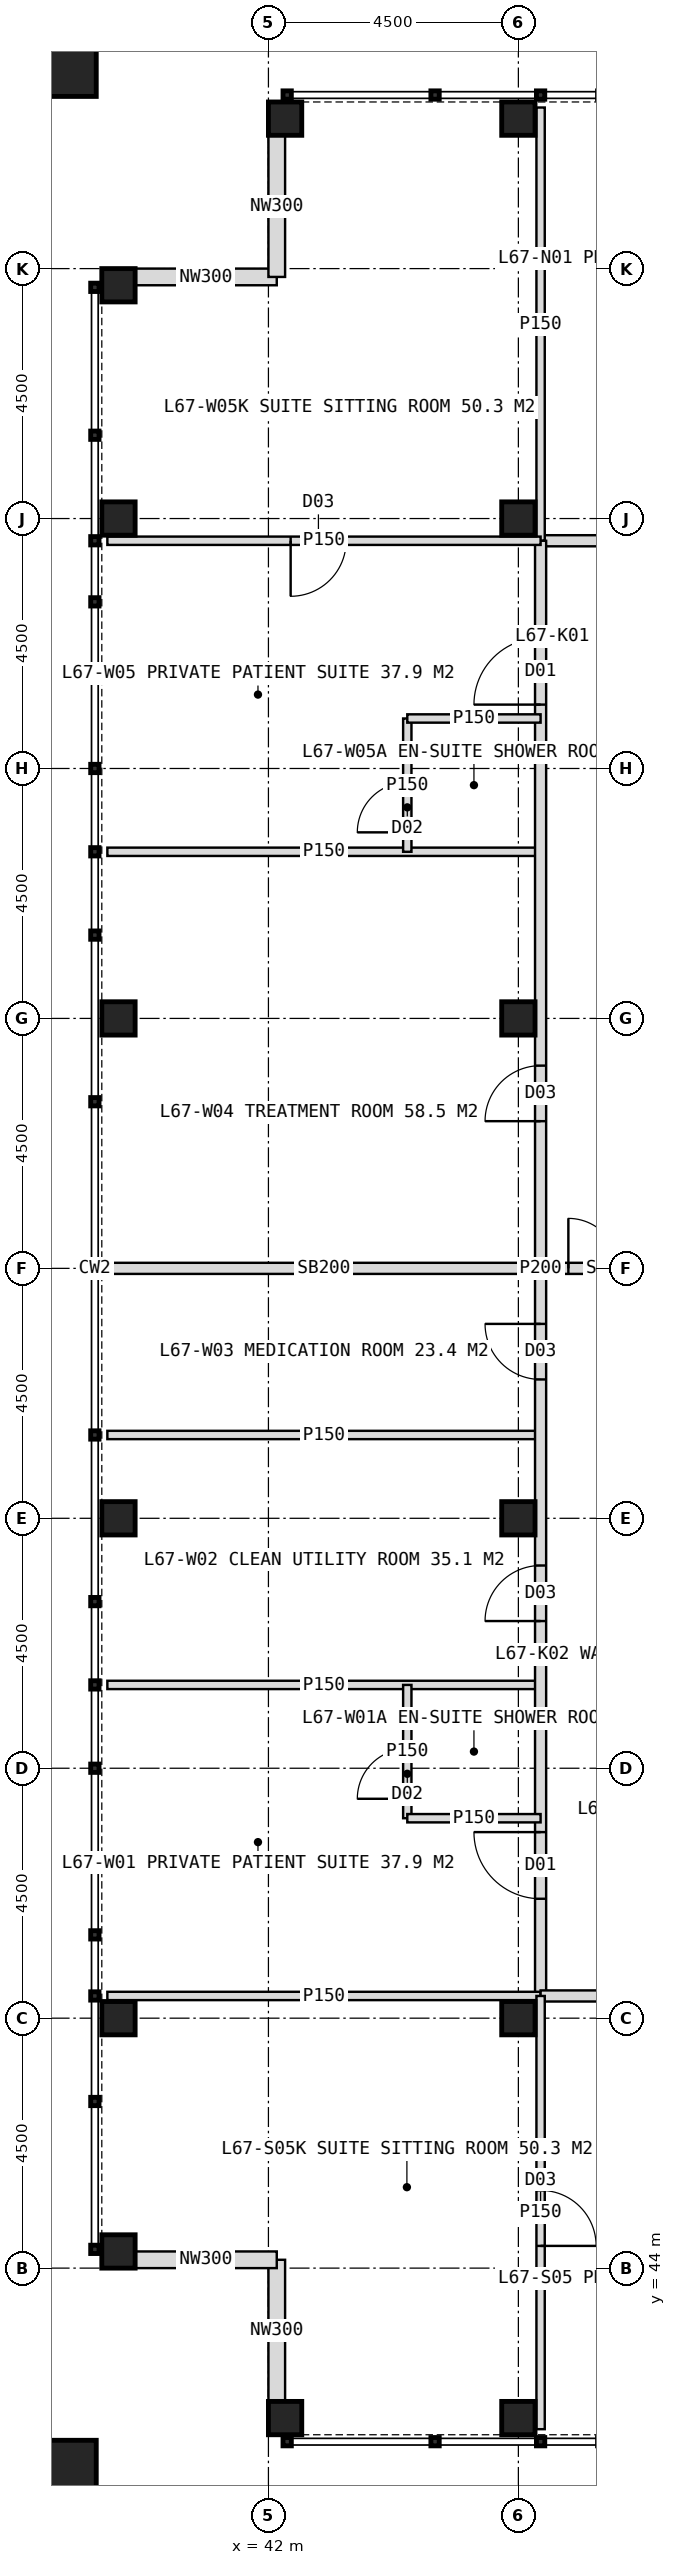
"""IFC4 building model, lengths in metres.
Left out: names, types, materials, properties, quantities, classifications, styles, units other than length and angle.
Written with IfcOpenShell. Run it as: python <this file> out.ifc"""

import sys

from ifc_helpers import new_model, si_unit, direction, frame, frame_2d, origin, origin_2d, place, context, subcontext, project, spatial, rectangle, hollow_rectangle, extrude, element, fill, save


model = new_model("IFC4")
c1 = context("Model", 3, precision=1e-05, world=origin(), true_north=direction((0.0, 1.0)))
c2 = subcontext(c1, "Body", "Model", "MODEL_VIEW")
j1 = project(units=[si_unit("LENGTHUNIT", "METRE"), si_unit("PLANEANGLEUNIT", "RADIAN")], contexts=[c1])
p1 = place(None, origin())
s1 = spatial("IfcSite", under=j1, at=p1, CompositionType="ELEMENT")
p2 = place(p1, origin())
s2 = spatial("IfcBuilding", under=s1, at=p2, CompositionType="ELEMENT")
p3 = place(p2, frame((0.0, 0.0, 278.0)))
s3 = spatial("IfcBuildingStorey", under=s2, at=p3, CompositionType="ELEMENT", Elevation=278.0)
for number, where, z_axis, x_axis in (
    (1, (46.5, 48.5, 0.0), (0.0, 0.0, 1.0), (1.0, 0.0, 0.0)),
    (2, (46.5, 75.5, 0.0), (0.0, 0.0, 1.0), (1.0, 0.0, 0.0)),
    (3, (46.5, 57.5, 0.0), (0.0, 0.0, 1.0), (1.0, 0.0, 0.0)),
    (4, (46.5, 66.5, 0.0), (0.0, 0.0, 1.0), (1.0, 0.0, 0.0)),
    (5, (42.3, 41.3, 0.0), (0.0, 0.0, 1.0), (1.0, 0.0, 0.0)),
    (6, (42.3, 82.7, 0.0), (0.0, 0.0, 1.0), (1.0, 0.0, 0.0)),
    (7, (39.3, 44.3, 0.0), (0.0, 0.0, 1.0), (1.0, 0.0, 0.0)),
    (8, (46.5, 41.3, 0.0), (0.0, 0.0, 1.0), (1.0, 0.0, 0.0)),
    (9, (46.5, 82.7, 0.0), (0.0, 0.0, 1.0), (1.0, 0.0, 0.0)),
    (10, (39.3, 48.5, 0.0), (0.0, 0.0, 1.0), (1.0, 0.0, 0.0)),
    (11, (39.3, 57.5, 0.0), (0.0, 0.0, 1.0), (1.0, 0.0, 0.0)),
    (12, (39.3, 66.5, 0.0), (0.0, 0.0, 1.0), (1.0, 0.0, 0.0)),
    (13, (39.3, 75.5, 0.0), (0.0, 0.0, 1.0), (1.0, 0.0, 0.0)),
    (14, (39.3, 79.7, 0.0), (0.0, 0.0, 1.0), (1.0, 0.0, 0.0)),
):
    element("IfcColumn", number, at=place(p3, frame(where, z_axis=z_axis, x_axis=x_axis)), inside=s3, PredefinedType="COLUMN", context=c2, shape_type="SweptSolid", body=[
        extrude(hollow_rectangle(XDim=0.6, YDim=0.6, WallThickness=0.04, at=origin_2d()), origin(), (0.0, 0.0, 1.0), 4.0),
    ])
for number, where, z_axis, x_axis in (
    (15, (38.4, 40.4, 0.0), (0.0, 0.0, 1.0), (1.0, 0.0, 0.0)),
    (16, (38.4, 83.6, 0.0), (0.0, 0.0, 1.0), (1.0, 0.0, 0.0)),
):
    element("IfcColumn", number, at=place(p3, frame(where, z_axis=z_axis, x_axis=x_axis)), inside=s3, PredefinedType="COLUMN", context=c2, shape_type="SweptSolid", body=[
        extrude(hollow_rectangle(XDim=1.0, YDim=1.0, WallThickness=0.06, at=origin_2d()), origin(), (0.0, 0.0, 1.0), 4.0),
    ])
for number, where, z_axis, x_axis in (
    (17, (39.6, 79.85, 0.0), (0.0, 0.0, 1.0), (1.0, 0.0, 0.0)),
    (18, (42.15, 79.85, 0.0), (0.0, 0.0, 1.0), (0.0, 1.0, 0.0)),
    (19, (42.15, 41.6, 0.0), (0.0, 0.0, 1.0), (0.0, 1.0, 0.0)),
    (20, (42.15, 44.15, 0.0), (0.0, 0.0, 1.0), (-1.0, 0.0, 0.0)),
):
    element("IfcWall", number, at=place(p3, frame(where, z_axis=z_axis, x_axis=x_axis)), inside=s3, PredefinedType="ELEMENTEDWALL", context=c2, shape_type="SweptSolid", body=[
        extrude(rectangle(XDim=2.55, YDim=0.3, at=frame_2d((1.275, 0.0))), origin(), (0.0, 0.0, 1.0), 2.95),
    ])
p4 = place(p3, frame((46.9, 75.1, 0.0), z_axis=(0.0, 0.0, 1.0), x_axis=(1.0, 0.0, 0.0)))
e21 = element("IfcWall", 21, at=p4, inside=s3, PredefinedType="PARTITIONING", context=c2, shape_type="SweptSolid", body=[
    extrude(rectangle(XDim=26.2, YDim=0.2, at=frame_2d((13.1, 0.0))), origin(), (0.0, 0.0, 1.0), 3.75),
])
p5 = place(p4, frame((1.75, 0.0, 0.0)))
e22 = element("IfcOpeningElement", 22, at=p5, cuts=e21, PredefinedType="OPENING", context=c2, shape_type="SweptSolid", body=[
    extrude(rectangle(XDim=1.2, YDim=2.2, at=frame_2d((0.6, 1.1))), frame((0.0, 0.11, 0.0), z_axis=(0.0, -1.0, 0.0), x_axis=(1.0, 0.0, 0.0)), (0.0, 0.0, 1.0), 0.22),
])
p6 = place(p4, frame((6.75, 0.0, 0.0)))
e23 = element("IfcOpeningElement", 23, at=p6, cuts=e21, PredefinedType="OPENING", context=c2, shape_type="SweptSolid", body=[
    extrude(rectangle(XDim=1.0, YDim=2.1, at=frame_2d((0.5, 1.05))), frame((0.0, 0.11, 0.0), z_axis=(0.0, -1.0, 0.0), x_axis=(1.0, 0.0, 0.0)), (0.0, 0.0, 1.0), 0.22),
])
p7 = place(p4, frame((12.75, 0.0, 0.0)))
e24 = element("IfcOpeningElement", 24, at=p7, cuts=e21, PredefinedType="OPENING", context=c2, shape_type="SweptSolid", body=[
    extrude(rectangle(XDim=1.2, YDim=2.2, at=frame_2d((0.6, 1.1))), frame((0.0, 0.11, 0.0), z_axis=(0.0, -1.0, 0.0), x_axis=(1.0, 0.0, 0.0)), (0.0, 0.0, 1.0), 0.22),
])
p8 = place(p4, frame((18.45, 0.0, 0.0)))
e25 = element("IfcOpeningElement", 25, at=p8, cuts=e21, PredefinedType="OPENING", context=c2, shape_type="SweptSolid", body=[
    extrude(rectangle(XDim=1.0, YDim=2.1, at=frame_2d((0.5, 1.05))), frame((0.0, 0.11, 0.0), z_axis=(0.0, -1.0, 0.0), x_axis=(1.0, 0.0, 0.0)), (0.0, 0.0, 1.0), 0.22),
])
p9 = place(p4, frame((23.25, 0.0, 0.0)))
e26 = element("IfcOpeningElement", 26, at=p9, cuts=e21, PredefinedType="OPENING", context=c2, shape_type="SweptSolid", body=[
    extrude(rectangle(XDim=1.2, YDim=2.2, at=frame_2d((0.6, 1.1))), frame((0.0, 0.11, 0.0), z_axis=(0.0, -1.0, 0.0), x_axis=(1.0, 0.0, 0.0)), (0.0, 0.0, 1.0), 0.22),
])
for number, where, z_axis, x_axis in (
    (27, (46.9, 75.1, 0.0), (0.0, 0.0, 1.0), (0.0, 1.0, 0.0)),
    (28, (46.9, 54.5, 0.0), (0.0, 0.0, 1.0), (-1.0, 0.0, 0.0)),
    (29, (46.9, 59.0, 0.0), (0.0, 0.0, 1.0), (-1.0, 0.0, 0.0)),
):
    element("IfcWall", number, at=place(p3, frame(where, z_axis=z_axis, x_axis=x_axis)), inside=s3, PredefinedType="PARTITIONING", context=c2, shape_type="SweptSolid", body=[
        extrude(rectangle(XDim=7.8, YDim=0.15, at=frame_2d((3.9, 0.0))), origin(), (0.0, 0.0, 1.0), 3.75),
    ])
p10 = place(p3, frame((46.9, 62.0, 0.0), z_axis=(0.0, 0.0, 1.0), x_axis=(-1.0, 0.0, 0.0)))
e30 = element("IfcWall", 30, at=p10, inside=s3, PredefinedType="SOLIDWALL", context=c2, shape_type="SweptSolid", body=[
    extrude(rectangle(XDim=7.8, YDim=0.2, at=frame_2d((3.9, 0.0))), origin(), (0.0, 0.0, 1.0), 2.75),
])
p11 = place(p3, frame((46.9, 69.5, 0.0), z_axis=(0.0, 0.0, 1.0), x_axis=(-1.0, 0.0, 0.0)))
e31 = element("IfcWall", 31, at=p11, inside=s3, PredefinedType="PARTITIONING", context=c2, shape_type="SweptSolid", body=[
    extrude(rectangle(XDim=7.8, YDim=0.15, at=frame_2d((3.9, 0.0))), origin(), (0.0, 0.0, 1.0), 3.75),
])
p12 = place(p3, frame((46.9, 48.9, 0.0), z_axis=(0.0, 0.0, 1.0), x_axis=(0.0, 1.0, 0.0)))
e32 = element("IfcWall", 32, at=p12, inside=s3, PredefinedType="PARTITIONING", context=c2, shape_type="SweptSolid", body=[
    extrude(rectangle(XDim=26.2, YDim=0.2, at=frame_2d((13.1, 0.0))), origin(), (0.0, 0.0, 1.0), 3.75),
])
p13 = place(p12, frame((1.75, 0.0, 0.0)))
e33 = element("IfcOpeningElement", 33, at=p13, cuts=e32, PredefinedType="OPENING", context=c2, shape_type="SweptSolid", body=[
    extrude(rectangle(XDim=1.2, YDim=2.2, at=frame_2d((0.6, 1.1))), frame((0.0, 0.11, 0.0), z_axis=(0.0, -1.0, 0.0), x_axis=(1.0, 0.0, 0.0)), (0.0, 0.0, 1.0), 0.22),
])
p14 = place(p12, frame((6.75, 0.0, 0.0)))
e34 = element("IfcOpeningElement", 34, at=p14, cuts=e32, PredefinedType="OPENING", context=c2, shape_type="SweptSolid", body=[
    extrude(rectangle(XDim=1.0, YDim=2.1, at=frame_2d((0.5, 1.05))), frame((0.0, 0.11, 0.0), z_axis=(0.0, -1.0, 0.0), x_axis=(1.0, 0.0, 0.0)), (0.0, 0.0, 1.0), 0.22),
])
p15 = place(p12, frame((11.1, 0.0, 0.0)))
e35 = element("IfcOpeningElement", 35, at=p15, cuts=e32, PredefinedType="OPENING", context=c2, shape_type="SweptSolid", body=[
    extrude(rectangle(XDim=1.0, YDim=2.1, at=frame_2d((0.5, 1.05))), frame((0.0, 0.11, 0.0), z_axis=(0.0, -1.0, 0.0), x_axis=(1.0, 0.0, 0.0)), (0.0, 0.0, 1.0), 0.22),
])
p16 = place(p12, frame((15.75, 0.0, 0.0)))
e36 = element("IfcOpeningElement", 36, at=p16, cuts=e32, PredefinedType="OPENING", context=c2, shape_type="SweptSolid", body=[
    extrude(rectangle(XDim=1.0, YDim=2.1, at=frame_2d((0.5, 1.05))), frame((0.0, 0.11, 0.0), z_axis=(0.0, -1.0, 0.0), x_axis=(1.0, 0.0, 0.0)), (0.0, 0.0, 1.0), 0.22),
])
p17 = place(p12, frame((23.25, 0.0, 0.0)))
e37 = element("IfcOpeningElement", 37, at=p17, cuts=e32, PredefinedType="OPENING", context=c2, shape_type="SweptSolid", body=[
    extrude(rectangle(XDim=1.2, YDim=2.2, at=frame_2d((0.6, 1.1))), frame((0.0, 0.11, 0.0), z_axis=(0.0, -1.0, 0.0), x_axis=(1.0, 0.0, 0.0)), (0.0, 0.0, 1.0), 0.22),
])
p18 = place(p3, frame((46.9, 48.9, 0.0), z_axis=(0.0, 0.0, 1.0), x_axis=(-1.0, 0.0, 0.0)))
e38 = element("IfcWall", 38, at=p18, inside=s3, PredefinedType="PARTITIONING", context=c2, shape_type="SweptSolid", body=[
    extrude(rectangle(XDim=7.8, YDim=0.15, at=frame_2d((3.9, 0.0))), origin(), (0.0, 0.0, 1.0), 3.75),
])
p19 = place(p3, frame((44.5, 52.1, 0.0), z_axis=(0.0, 0.0, 1.0), x_axis=(0.0, 1.0, 0.0)))
e39 = element("IfcWall", 39, at=p19, inside=s3, PredefinedType="PARTITIONING", context=c2, shape_type="SweptSolid", body=[
    extrude(rectangle(XDim=2.4, YDim=0.15, at=frame_2d((1.2, 0.0))), origin(), (0.0, 0.0, 1.0), 3.75),
])
p20 = place(p19, frame((0.35, 0.0, 0.0)))
e40 = element("IfcOpeningElement", 40, at=p20, cuts=e39, PredefinedType="OPENING", context=c2, shape_type="SweptSolid", body=[
    extrude(rectangle(XDim=0.9, YDim=2.1, at=frame_2d((0.45, 1.05))), frame((0.0, 0.085, 0.0), z_axis=(0.0, -1.0, 0.0), x_axis=(1.0, 0.0, 0.0)), (0.0, 0.0, 1.0), 0.17),
])
p21 = place(p3, frame((46.9, 52.1, 0.0), z_axis=(0.0, 0.0, 1.0), x_axis=(-1.0, 0.0, 0.0)))
e41 = element("IfcWall", 41, at=p21, inside=s3, PredefinedType="PARTITIONING", context=c2, shape_type="SweptSolid", body=[
    extrude(rectangle(XDim=2.4, YDim=0.15, at=frame_2d((1.2, 0.0))), origin(), (0.0, 0.0, 1.0), 3.75),
])
p22 = place(p3, frame((46.9, 75.1, 0.0), z_axis=(0.0, 0.0, 1.0), x_axis=(-1.0, 0.0, 0.0)))
e42 = element("IfcWall", 42, at=p22, inside=s3, PredefinedType="PARTITIONING", context=c2, shape_type="SweptSolid", body=[
    extrude(rectangle(XDim=7.8, YDim=0.15, at=frame_2d((3.9, 0.0))), origin(), (0.0, 0.0, 1.0), 3.75),
])
p23 = place(p22, frame((3.5, 0.0, 0.0)))
e43 = element("IfcOpeningElement", 43, at=p23, cuts=e42, PredefinedType="OPENING", context=c2, shape_type="SweptSolid", body=[
    extrude(rectangle(XDim=1.0, YDim=2.1, at=frame_2d((0.5, 1.05))), frame((0.0, 0.085, 0.0), z_axis=(0.0, -1.0, 0.0), x_axis=(1.0, 0.0, 0.0)), (0.0, 0.0, 1.0), 0.17),
])
p24 = place(p3, frame((44.5, 69.5, 0.0), z_axis=(0.0, 0.0, 1.0), x_axis=(0.0, 1.0, 0.0)))
e44 = element("IfcWall", 44, at=p24, inside=s3, PredefinedType="PARTITIONING", context=c2, shape_type="SweptSolid", body=[
    extrude(rectangle(XDim=2.4, YDim=0.15, at=frame_2d((1.2, 0.0))), origin(), (0.0, 0.0, 1.0), 3.75),
])
p25 = place(p24, frame((0.35, 0.0, 0.0)))
e45 = element("IfcOpeningElement", 45, at=p25, cuts=e44, PredefinedType="OPENING", context=c2, shape_type="SweptSolid", body=[
    extrude(rectangle(XDim=0.9, YDim=2.1, at=frame_2d((0.45, 1.05))), frame((0.0, 0.085, 0.0), z_axis=(0.0, -1.0, 0.0), x_axis=(1.0, 0.0, 0.0)), (0.0, 0.0, 1.0), 0.17),
])
p26 = place(p3, frame((46.9, 71.9, 0.0), z_axis=(0.0, 0.0, 1.0), x_axis=(-1.0, 0.0, 0.0)))
e46 = element("IfcWall", 46, at=p26, inside=s3, PredefinedType="PARTITIONING", context=c2, shape_type="SweptSolid", body=[
    extrude(rectangle(XDim=2.4, YDim=0.15, at=frame_2d((1.2, 0.0))), origin(), (0.0, 0.0, 1.0), 3.75),
])
p27 = place(p3, frame((73.1, 48.9, 0.0), z_axis=(0.0, 0.0, 1.0), x_axis=(-1.0, 0.0, 0.0)))
e47 = element("IfcWall", 47, at=p27, inside=s3, PredefinedType="PARTITIONING", context=c2, shape_type="SweptSolid", body=[
    extrude(rectangle(XDim=26.2, YDim=0.2, at=frame_2d((13.1, 0.0))), origin(), (0.0, 0.0, 1.0), 3.75),
])
p28 = place(p27, frame((1.55, 0.0, 0.0)))
e48 = element("IfcOpeningElement", 48, at=p28, cuts=e47, PredefinedType="OPENING", context=c2, shape_type="SweptSolid", body=[
    extrude(rectangle(XDim=1.0, YDim=2.1, at=frame_2d((0.5, 1.05))), frame((0.0, 0.11, 0.0), z_axis=(0.0, -1.0, 0.0), x_axis=(1.0, 0.0, 0.0)), (0.0, 0.0, 1.0), 0.22),
])
p29 = place(p27, frame((6.75, 0.0, 0.0)))
e49 = element("IfcOpeningElement", 49, at=p29, cuts=e47, PredefinedType="OPENING", context=c2, shape_type="SweptSolid", body=[
    extrude(rectangle(XDim=1.0, YDim=2.1, at=frame_2d((0.5, 1.05))), frame((0.0, 0.11, 0.0), z_axis=(0.0, -1.0, 0.0), x_axis=(1.0, 0.0, 0.0)), (0.0, 0.0, 1.0), 0.22),
])
p30 = place(p27, frame((14.25, 0.0, 0.0)))
e50 = element("IfcOpeningElement", 50, at=p30, cuts=e47, PredefinedType="OPENING", context=c2, shape_type="SweptSolid", body=[
    extrude(rectangle(XDim=1.2, YDim=2.2, at=frame_2d((0.6, 1.1))), frame((0.0, 0.11, 0.0), z_axis=(0.0, -1.0, 0.0), x_axis=(1.0, 0.0, 0.0)), (0.0, 0.0, 1.0), 0.22),
])
p31 = place(p27, frame((18.45, 0.0, 0.0)))
e51 = element("IfcOpeningElement", 51, at=p31, cuts=e47, PredefinedType="OPENING", context=c2, shape_type="SweptSolid", body=[
    extrude(rectangle(XDim=1.0, YDim=2.1, at=frame_2d((0.5, 1.05))), frame((0.0, 0.11, 0.0), z_axis=(0.0, -1.0, 0.0), x_axis=(1.0, 0.0, 0.0)), (0.0, 0.0, 1.0), 0.22),
])
p32 = place(p27, frame((23.25, 0.0, 0.0)))
e52 = element("IfcOpeningElement", 52, at=p32, cuts=e47, PredefinedType="OPENING", context=c2, shape_type="SweptSolid", body=[
    extrude(rectangle(XDim=1.2, YDim=2.2, at=frame_2d((0.6, 1.1))), frame((0.0, 0.11, 0.0), z_axis=(0.0, -1.0, 0.0), x_axis=(1.0, 0.0, 0.0)), (0.0, 0.0, 1.0), 0.22),
])
p33 = place(p3, frame((46.9, 48.9, 0.0), z_axis=(0.0, 0.0, 1.0), x_axis=(0.0, -1.0, 0.0)))
e53 = element("IfcWall", 53, at=p33, inside=s3, PredefinedType="PARTITIONING", context=c2, shape_type="SweptSolid", body=[
    extrude(rectangle(XDim=7.8, YDim=0.15, at=frame_2d((3.9, 0.0))), origin(), (0.0, 0.0, 1.0), 3.75),
])
p34 = place(p33, frame((3.5, 0.0, 0.0)))
e54 = element("IfcOpeningElement", 54, at=p34, cuts=e53, PredefinedType="OPENING", context=c2, shape_type="SweptSolid", body=[
    extrude(rectangle(XDim=1.0, YDim=2.1, at=frame_2d((0.5, 1.05))), frame((0.0, 0.085, 0.0), z_axis=(0.0, -1.0, 0.0), x_axis=(1.0, 0.0, 0.0)), (0.0, 0.0, 1.0), 0.17),
])
p35 = place(p3, frame((49.5, 62.0, 0.0), z_axis=(0.0, 0.0, 1.0), x_axis=(-1.0, 0.0, 0.0)))
e55 = element("IfcWall", 55, at=p35, inside=s3, PredefinedType="SOLIDWALL", context=c2, shape_type="SweptSolid", body=[
    extrude(rectangle(XDim=2.6, YDim=0.2, at=frame_2d((1.3, 0.0))), origin(), (0.0, 0.0, 1.0), 2.75),
])
p36 = place(p35, frame((0.3, 0.0, 0.0)))
e56 = element("IfcOpeningElement", 56, at=p36, cuts=e55, PredefinedType="OPENING", context=c2, shape_type="SweptSolid", body=[
    extrude(rectangle(XDim=1.8, YDim=2.2, at=frame_2d((0.9, 1.1))), frame((0.0, 0.11, 0.0), z_axis=(0.0, -1.0, 0.0), x_axis=(1.0, 0.0, 0.0)), (0.0, 0.0, 1.0), 0.22),
])
p37 = place(p13, origin())
e57 = element("IfcDoor", 57, at=p37, inside=s3, OperationType="SINGLE_SWING_RIGHT", PredefinedType="DOOR", context=c2, shape_type="SweptSolid", body=[
    extrude(rectangle(XDim=1.2, YDim=2.2, at=frame_2d((0.6, 1.1))), frame((0.0, 0.025, 0.0), z_axis=(0.0, -1.0, 0.0), x_axis=(1.0, 0.0, 0.0)), (0.0, 0.0, 1.0), 0.05),
])
fill(e33, e57)
p38 = place(p20, origin())
e58 = element("IfcDoor", 58, at=p38, inside=s3, OperationType="SINGLE_SWING_LEFT", PredefinedType="DOOR", context=c2, shape_type="SweptSolid", body=[
    extrude(rectangle(XDim=0.9, YDim=2.1, at=frame_2d((0.45, 1.05))), frame((0.0, 0.025, 0.0), z_axis=(0.0, -1.0, 0.0), x_axis=(1.0, 0.0, 0.0)), (0.0, 0.0, 1.0), 0.05),
])
fill(e40, e58)
p39 = place(p14, origin())
e59 = element("IfcDoor", 59, at=p39, inside=s3, OperationType="SINGLE_SWING_LEFT", PredefinedType="DOOR", context=c2, shape_type="SweptSolid", body=[
    extrude(rectangle(XDim=1.0, YDim=2.1, at=frame_2d((0.5, 1.05))), frame((0.0, 0.025, 0.0), z_axis=(0.0, -1.0, 0.0), x_axis=(1.0, 0.0, 0.0)), (0.0, 0.0, 1.0), 0.05),
])
fill(e34, e59)
p40 = place(p15, origin())
e60 = element("IfcDoor", 60, at=p40, inside=s3, OperationType="SINGLE_SWING_RIGHT", PredefinedType="DOOR", context=c2, shape_type="SweptSolid", body=[
    extrude(rectangle(XDim=1.0, YDim=2.1, at=frame_2d((0.5, 1.05))), frame((0.0, 0.025, 0.0), z_axis=(0.0, -1.0, 0.0), x_axis=(1.0, 0.0, 0.0)), (0.0, 0.0, 1.0), 0.05),
])
fill(e35, e60)
p41 = place(p16, origin())
e61 = element("IfcDoor", 61, at=p41, inside=s3, OperationType="SINGLE_SWING_LEFT", PredefinedType="DOOR", context=c2, shape_type="SweptSolid", body=[
    extrude(rectangle(XDim=1.0, YDim=2.1, at=frame_2d((0.5, 1.05))), frame((0.0, 0.025, 0.0), z_axis=(0.0, -1.0, 0.0), x_axis=(1.0, 0.0, 0.0)), (0.0, 0.0, 1.0), 0.05),
])
fill(e36, e61)
p42 = place(p23, origin())
e62 = element("IfcDoor", 62, at=p42, inside=s3, OperationType="SINGLE_SWING_RIGHT", PredefinedType="DOOR", context=c2, shape_type="SweptSolid", body=[
    extrude(rectangle(XDim=1.0, YDim=2.1, at=frame_2d((0.5, 1.05))), frame((0.0, 0.025, 0.0), z_axis=(0.0, -1.0, 0.0), x_axis=(1.0, 0.0, 0.0)), (0.0, 0.0, 1.0), 0.05),
])
fill(e43, e62)
p43 = place(p17, origin())
e63 = element("IfcDoor", 63, at=p43, inside=s3, OperationType="SINGLE_SWING_LEFT", PredefinedType="DOOR", context=c2, shape_type="SweptSolid", body=[
    extrude(rectangle(XDim=1.2, YDim=2.2, at=frame_2d((0.6, 1.1))), frame((0.0, 0.025, 0.0), z_axis=(0.0, -1.0, 0.0), x_axis=(1.0, 0.0, 0.0)), (0.0, 0.0, 1.0), 0.05),
])
fill(e37, e63)
p44 = place(p25, origin())
e64 = element("IfcDoor", 64, at=p44, inside=s3, OperationType="SINGLE_SWING_LEFT", PredefinedType="DOOR", context=c2, shape_type="SweptSolid", body=[
    extrude(rectangle(XDim=0.9, YDim=2.1, at=frame_2d((0.45, 1.05))), frame((0.0, 0.025, 0.0), z_axis=(0.0, -1.0, 0.0), x_axis=(1.0, 0.0, 0.0)), (0.0, 0.0, 1.0), 0.05),
])
fill(e45, e64)
p45 = place(p34, origin())
e65 = element("IfcDoor", 65, at=p45, inside=s3, OperationType="SINGLE_SWING_RIGHT", PredefinedType="DOOR", context=c2, shape_type="SweptSolid", body=[
    extrude(rectangle(XDim=1.0, YDim=2.1, at=frame_2d((0.5, 1.05))), frame((0.0, 0.025, 0.0), z_axis=(0.0, -1.0, 0.0), x_axis=(1.0, 0.0, 0.0)), (0.0, 0.0, 1.0), 0.05),
])
fill(e54, e65)
p46 = place(p36, origin())
e66 = element("IfcDoor", 66, at=p46, inside=s3, OperationType="DOUBLE_DOOR_DOUBLE_SWING", PredefinedType="DOOR", context=c2, shape_type="SweptSolid", body=[
    extrude(rectangle(XDim=1.8, YDim=2.2, at=frame_2d((0.9, 1.1))), frame((0.0, 0.025, 0.0), z_axis=(0.0, -1.0, 0.0), x_axis=(1.0, 0.0, 0.0)), (0.0, 0.0, 1.0), 0.05),
])
fill(e56, e66)
save(model, sys.argv[1])
